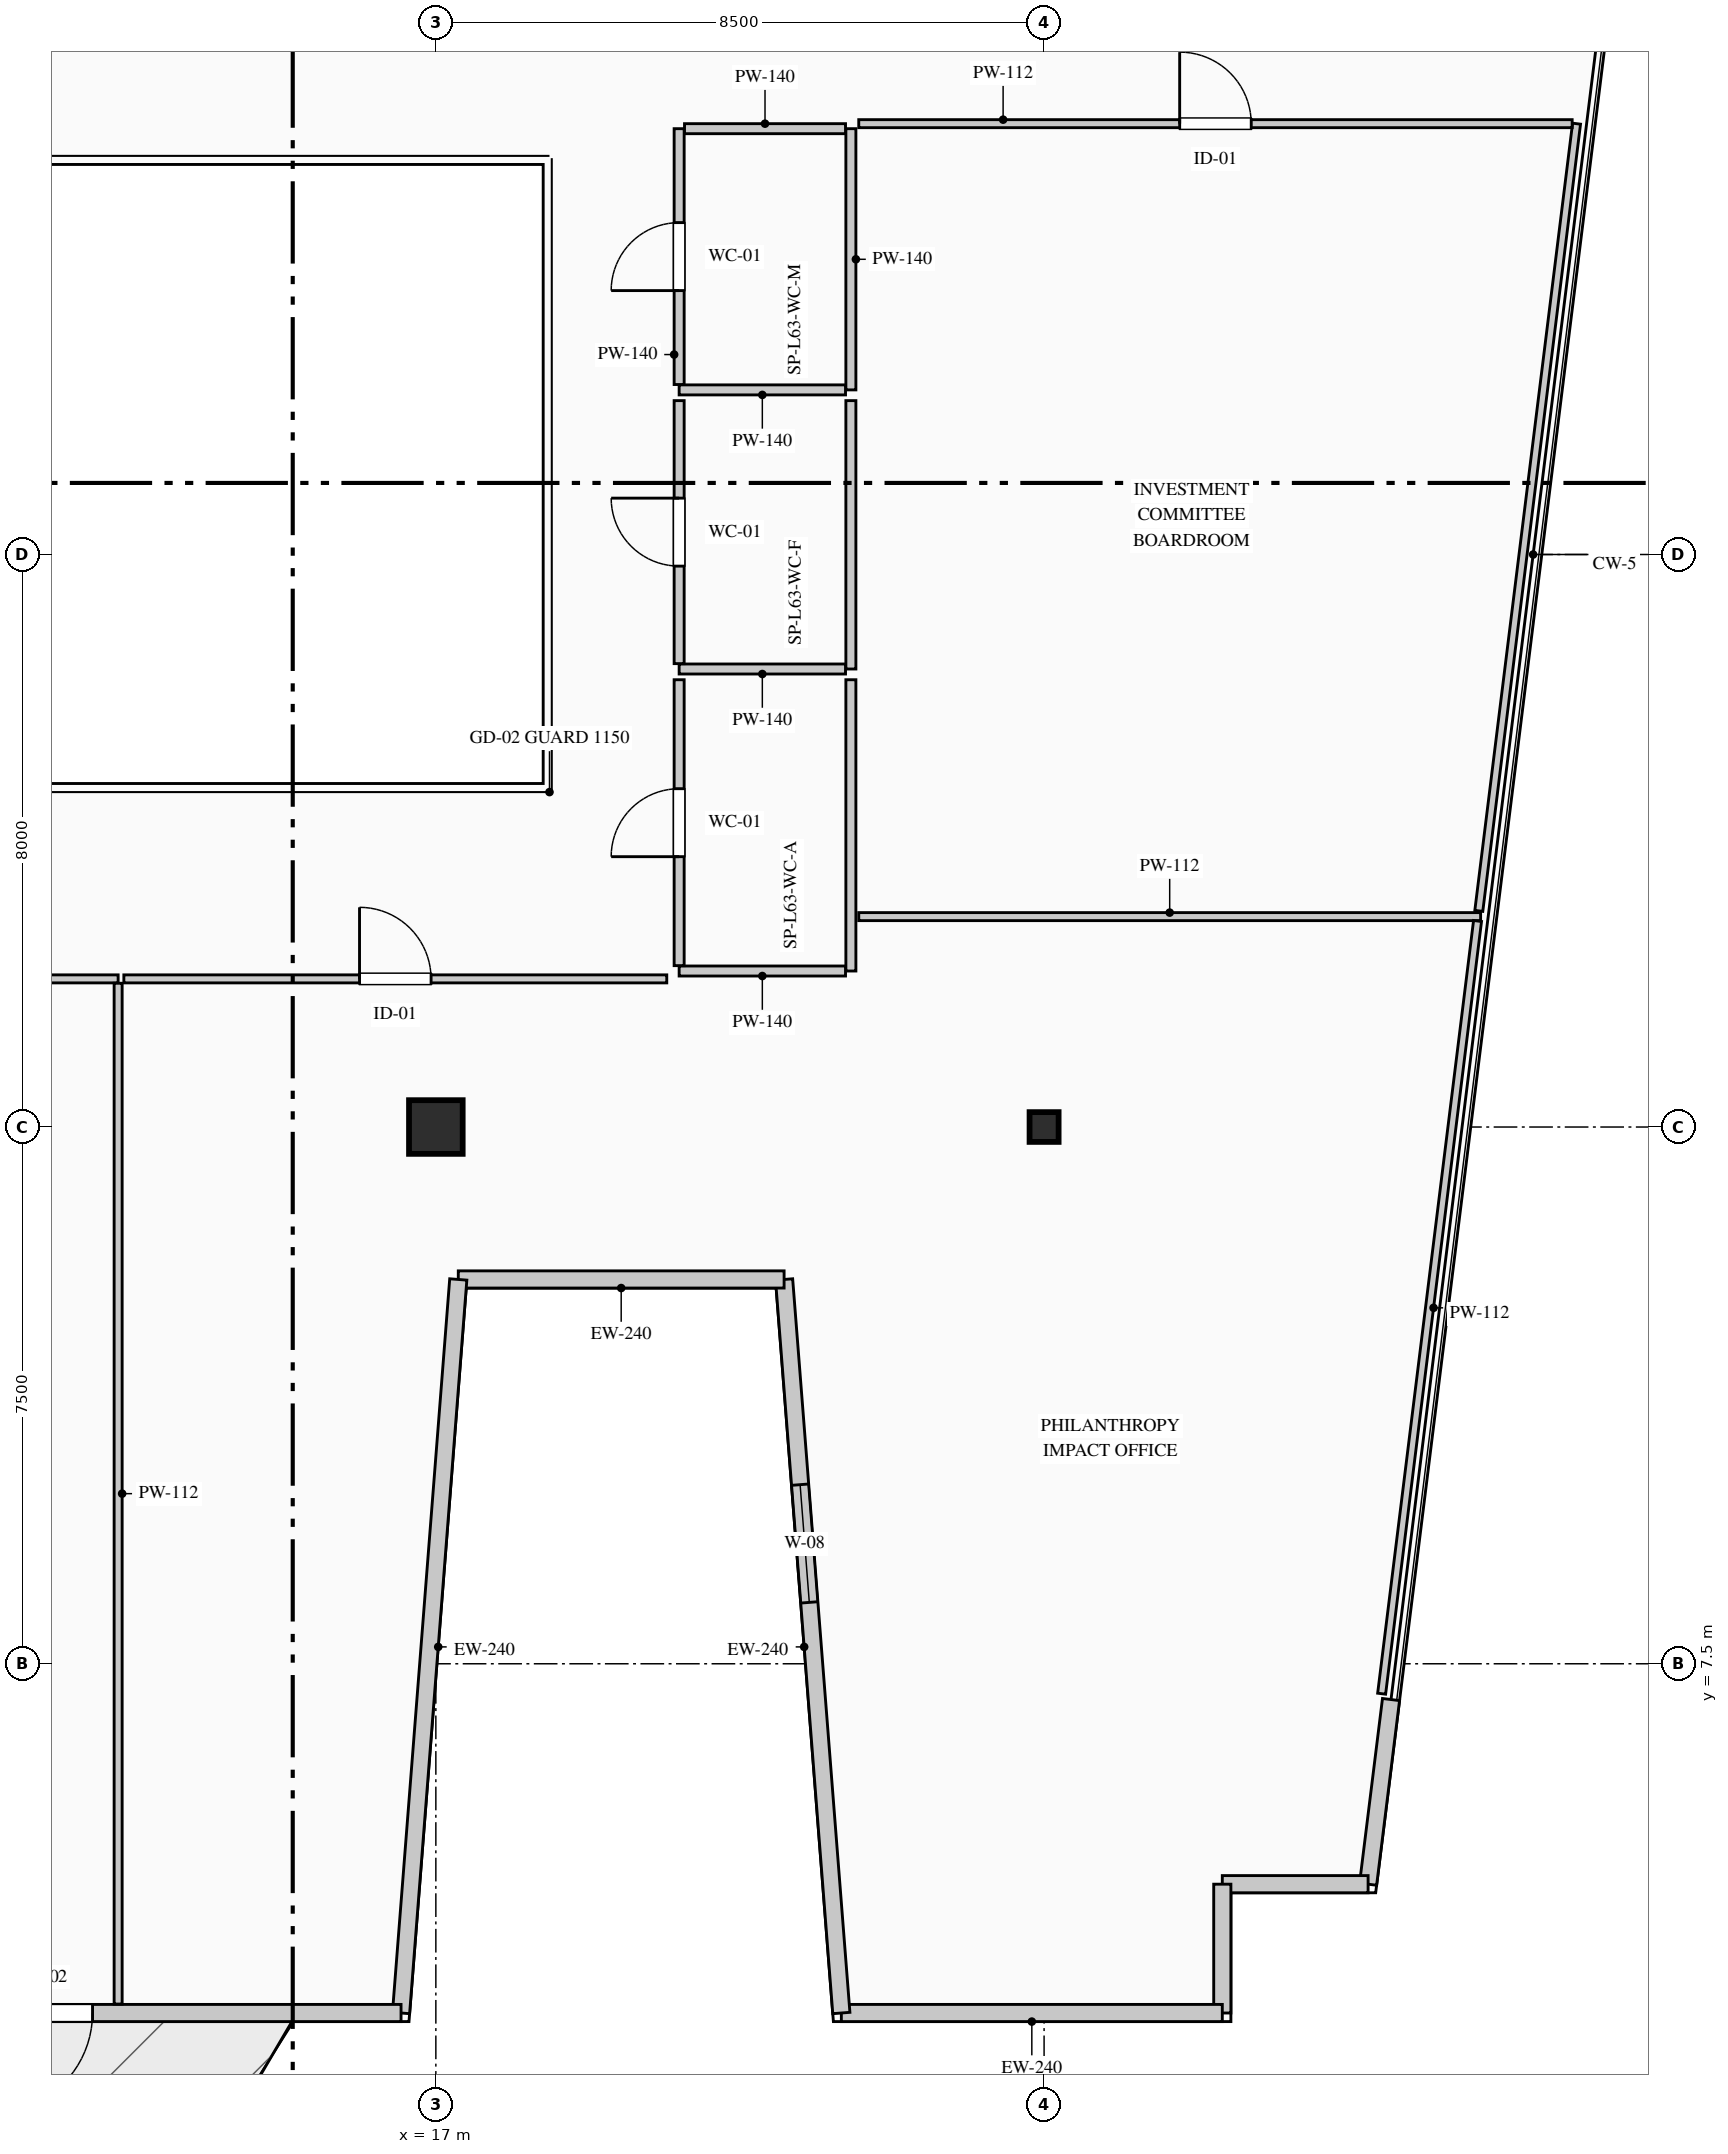
"""IFC4 building model, lengths in metres.
Left out: names, types, materials, properties, quantities, classifications, styles, units other than length and angle.
Written with IfcOpenShell. Run it as: python <this file> out.ifc"""

import sys

from ifc_helpers import new_model, si_unit, direction, frame, frame_2d, origin, origin_2d, place, context, subcontext, project, spatial, rectangle, i_section, extrude, element, fill, save


model = new_model("IFC4")
c1 = context("Model", 3, precision=1e-05, world=origin(), true_north=direction((0.0, 1.0)))
c2 = subcontext(c1, "Body", "Model", "MODEL_VIEW")
j1 = project(units=[si_unit("LENGTHUNIT", "METRE"), si_unit("PLANEANGLEUNIT", "RADIAN")], contexts=[c1])
p1 = place(None, origin())
s1 = spatial("IfcSite", under=j1, at=p1, CompositionType="ELEMENT")
p2 = place(p1, origin())
s2 = spatial("IfcBuilding", under=s1, at=p2, CompositionType="ELEMENT")
p3 = place(p2, frame((0.0, 0.0, 264.6)))
s3 = spatial("IfcBuildingStorey", under=s2, at=p3, CompositionType="ELEMENT", Elevation=264.6)
p4 = place(p3, frame((17.0, 15.0, 0.0), z_axis=(0.0, 0.0, 1.0), x_axis=(1.0, 0.0, 0.0)))
e1 = element("IfcColumn", 1, at=p4, inside=s3, PredefinedType="COLUMN", context=c2, shape_type="SweptSolid", body=[
    extrude(rectangle(XDim=0.75, YDim=0.75, at=origin_2d()), origin(), (0.0, 0.0, 1.0), 3.95),
])
p5 = place(p3, frame((25.5, 15.0, 0.0), z_axis=(0.0, 0.0, 1.0), x_axis=(1.0, 0.0, 0.0)))
e2 = element("IfcColumn", 2, at=p5, inside=s3, PredefinedType="COLUMN", context=c2, shape_type="SweptSolid", body=[
    extrude(i_section(OverallWidth=0.406, OverallDepth=0.416, WebThickness=0.03, FlangeThickness=0.048, FilletRadius=0.015, at=origin_2d()), origin(), (0.0, 0.0, 1.0), 3.95),
])
p6 = place(p3, frame((30.348, 7.0, 0.0), z_axis=(0.0, 0.0, 1.0), x_axis=(-0.123191073593, -0.992382970121, 0.0)))
e3 = element("IfcWall", 3, at=p6, inside=s3, PredefinedType="STANDARD", context=c2, shape_type="SweptSolid", body=[
    extrude(rectangle(XDim=2.6, YDim=0.24, at=frame_2d((1.3, 0.0))), origin(), (0.0, 0.0, 1.0), 3.7),
])
p7 = place(p3, frame((30.028, 4.42, 0.0), z_axis=(0.0, 0.0, 1.0), x_axis=(-1.0, 0.0, 0.0)))
e4 = element("IfcWall", 4, at=p7, inside=s3, PredefinedType="STANDARD", context=c2, shape_type="SweptSolid", body=[
    extrude(rectangle(XDim=2.037, YDim=0.24, at=frame_2d((1.019, 0.0))), origin(), (0.0, 0.0, 1.0), 3.7),
])
p8 = place(p3, frame((27.99, 4.42, 0.0), z_axis=(0.0, 0.0, 1.0), x_axis=(0.0, -1.0, 0.0)))
e5 = element("IfcWall", 5, at=p8, inside=s3, PredefinedType="STANDARD", context=c2, shape_type="SweptSolid", body=[
    extrude(rectangle(XDim=1.8, YDim=0.24, at=frame_2d((0.9, 0.0))), origin(), (0.0, 0.0, 1.0), 3.7),
])
p9 = place(p3, frame((27.99, 2.62, 0.0), z_axis=(0.0, 0.0, 1.0), x_axis=(-1.0, 0.0, 0.0)))
e6 = element("IfcWall", 6, at=p9, inside=s3, PredefinedType="STANDARD", context=c2, shape_type="SweptSolid", body=[
    extrude(rectangle(XDim=5.324, YDim=0.24, at=frame_2d((2.662, 0.0))), origin(), (0.0, 0.0, 1.0), 3.7),
])
p10 = place(p3, frame((22.667, 2.62, 0.0), z_axis=(0.0, 0.0, 1.0), x_axis=(-0.077816860153, 0.996967670627, 0.0)))
e7 = element("IfcWall", 7, at=p10, inside=s3, PredefinedType="STANDARD", context=c2, shape_type="SweptSolid", body=[
    extrude(rectangle(XDim=10.281, YDim=0.24, at=frame_2d((5.141, 0.0))), origin(), (0.0, 0.0, 1.0), 3.7),
])
p11 = place(p10, frame((5.755, 0.0, 0.9)))
e8 = element("IfcOpeningElement", 8, at=p11, cuts=e7, PredefinedType="OPENING", context=c2, shape_type="SweptSolid", body=[
    extrude(rectangle(XDim=1.65, YDim=1.95, at=frame_2d((0.825, 0.975))), frame((0.0, 0.13, 0.0), z_axis=(0.0, -1.0, 0.0), x_axis=(1.0, 0.0, 0.0)), (0.0, 0.0, 1.0), 0.26),
])
p12 = place(p3, frame((21.867, 12.87, 0.0), z_axis=(0.0, 0.0, 1.0), x_axis=(-1.0, 0.0, 0.0)))
e9 = element("IfcWall", 9, at=p12, inside=s3, PredefinedType="STANDARD", context=c2, shape_type="SweptSolid", body=[
    extrude(rectangle(XDim=4.553, YDim=0.24, at=frame_2d((2.277, 0.0))), origin(), (0.0, 0.0, 1.0), 3.7),
])
p13 = place(p3, frame((17.313, 12.87, 0.0), z_axis=(0.0, 0.0, 1.0), x_axis=(-0.077816860153, -0.996967670627, 0.0)))
e10 = element("IfcWall", 10, at=p13, inside=s3, PredefinedType="STANDARD", context=c2, shape_type="SweptSolid", body=[
    extrude(rectangle(XDim=10.281, YDim=0.24, at=frame_2d((5.141, 0.0))), origin(), (0.0, 0.0, 1.0), 3.7),
])
p14 = place(p3, frame((16.513, 2.62, 0.0), z_axis=(0.0, 0.0, 1.0), x_axis=(-1.0, 0.0, 0.0)))
e11 = element("IfcWall", 11, at=p14, inside=s3, PredefinedType="STANDARD", context=c2, shape_type="SweptSolid", body=[
    extrude(rectangle(XDim=8.408, YDim=0.24, at=frame_2d((4.204, 0.0))), origin(), (0.0, 0.0, 1.0), 3.7),
])
p15 = place(p14, frame((4.311, 0.0, 0.0)))
e12 = element("IfcOpeningElement", 12, at=p15, cuts=e11, PredefinedType="OPENING", context=c2, shape_type="SweptSolid", body=[
    extrude(rectangle(XDim=1.4, YDim=2.2, at=frame_2d((0.7, 1.1))), frame((0.0, 0.13, 0.0), z_axis=(0.0, -1.0, 0.0), x_axis=(1.0, 0.0, 0.0)), (0.0, 0.0, 1.0), 0.26),
])
p16 = place(p3, frame((22.8, 28.95, 0.0), z_axis=(0.0, 0.0, 1.0), x_axis=(0.0, -1.0, 0.0)))
e13 = element("IfcWall", 13, at=p16, inside=s3, PredefinedType="PARTITIONING", context=c2, shape_type="SweptSolid", body=[
    extrude(rectangle(XDim=3.65, YDim=0.14, at=frame_2d((1.825, 0.0))), origin(), (0.0, 0.0, 1.0), 3.385),
])
p17 = place(p3, frame((22.725, 25.3, 0.0), z_axis=(0.0, 0.0, 1.0), x_axis=(-1.0, 0.0, 0.0)))
e14 = element("IfcWall", 14, at=p17, inside=s3, PredefinedType="PARTITIONING", context=c2, shape_type="SweptSolid", body=[
    extrude(rectangle(XDim=2.325, YDim=0.14, at=frame_2d((1.163, 0.0))), origin(), (0.0, 0.0, 1.0), 3.7),
])
p18 = place(p3, frame((20.4, 25.375, 0.0), z_axis=(0.0, 0.0, 1.0), x_axis=(0.0, 1.0, 0.0)))
e15 = element("IfcWall", 15, at=p18, inside=s3, PredefinedType="PARTITIONING", context=c2, shape_type="SweptSolid", body=[
    extrude(rectangle(XDim=3.575, YDim=0.14, at=frame_2d((1.788, 0.0))), origin(), (0.0, 0.0, 1.0), 3.7),
])
p19 = place(p18, frame((1.312, 0.0, 0.0)))
e16 = element("IfcOpeningElement", 16, at=p19, cuts=e15, PredefinedType="OPENING", context=c2, shape_type="SweptSolid", body=[
    extrude(rectangle(XDim=0.95, YDim=2.15, at=frame_2d((0.475, 1.075))), frame((0.0, 0.08, 0.0), z_axis=(0.0, -1.0, 0.0), x_axis=(1.0, 0.0, 0.0)), (0.0, 0.0, 1.0), 0.16),
])
p20 = place(p3, frame((20.475, 28.95, 0.0), z_axis=(0.0, 0.0, 1.0), x_axis=(1.0, 0.0, 0.0)))
e17 = element("IfcWall", 17, at=p20, inside=s3, PredefinedType="PARTITIONING", context=c2, shape_type="SweptSolid", body=[
    extrude(rectangle(XDim=2.25, YDim=0.14, at=frame_2d((1.125, 0.0))), origin(), (0.0, 0.0, 1.0), 3.7),
])
p21 = place(p3, frame((22.8, 25.15, 0.0), z_axis=(0.0, 0.0, 1.0), x_axis=(0.0, -1.0, 0.0)))
e18 = element("IfcWall", 18, at=p21, inside=s3, PredefinedType="PARTITIONING", context=c2, shape_type="SweptSolid", body=[
    extrude(rectangle(XDim=3.75, YDim=0.14, at=frame_2d((1.875, 0.0))), origin(), (0.0, 0.0, 1.0), 3.385),
])
p22 = place(p3, frame((22.725, 21.4, 0.0), z_axis=(0.0, 0.0, 1.0), x_axis=(-1.0, 0.0, 0.0)))
e19 = element("IfcWall", 19, at=p22, inside=s3, PredefinedType="PARTITIONING", context=c2, shape_type="SweptSolid", body=[
    extrude(rectangle(XDim=2.325, YDim=0.14, at=frame_2d((1.163, 0.0))), origin(), (0.0, 0.0, 1.0), 3.7),
])
p23 = place(p3, frame((20.4, 21.475, 0.0), z_axis=(0.0, 0.0, 1.0), x_axis=(0.0, 1.0, 0.0)))
e20 = element("IfcWall", 20, at=p23, inside=s3, PredefinedType="PARTITIONING", context=c2, shape_type="SweptSolid", body=[
    extrude(rectangle(XDim=3.675, YDim=0.14, at=frame_2d((1.837, 0.0))), origin(), (0.0, 0.0, 1.0), 3.7),
])
p24 = place(p23, frame((1.363, 0.0, 0.0)))
e21 = element("IfcOpeningElement", 21, at=p24, cuts=e20, PredefinedType="OPENING", context=c2, shape_type="SweptSolid", body=[
    extrude(rectangle(XDim=0.95, YDim=2.15, at=frame_2d((0.475, 1.075))), frame((0.0, 0.08, 0.0), z_axis=(0.0, -1.0, 0.0), x_axis=(1.0, 0.0, 0.0)), (0.0, 0.0, 1.0), 0.16),
])
p25 = place(p3, frame((22.8, 21.25, 0.0), z_axis=(0.0, 0.0, 1.0), x_axis=(0.0, -1.0, 0.0)))
e22 = element("IfcWall", 22, at=p25, inside=s3, PredefinedType="PARTITIONING", context=c2, shape_type="SweptSolid", body=[
    extrude(rectangle(XDim=4.07, YDim=0.14, at=frame_2d((2.035, 0.0))), origin(), (0.0, 0.0, 1.0), 3.385),
])
p26 = place(p3, frame((22.725, 17.18, 0.0), z_axis=(0.0, 0.0, 1.0), x_axis=(-1.0, 0.0, 0.0)))
e23 = element("IfcWall", 23, at=p26, inside=s3, PredefinedType="PARTITIONING", context=c2, shape_type="SweptSolid", body=[
    extrude(rectangle(XDim=2.325, YDim=0.14, at=frame_2d((1.163, 0.0))), origin(), (0.0, 0.0, 1.0), 3.7),
])
p27 = place(p3, frame((20.4, 17.255, 0.0), z_axis=(0.0, 0.0, 1.0), x_axis=(0.0, 1.0, 0.0)))
e24 = element("IfcWall", 24, at=p27, inside=s3, PredefinedType="PARTITIONING", context=c2, shape_type="SweptSolid", body=[
    extrude(rectangle(XDim=3.995, YDim=0.14, at=frame_2d((1.998, 0.0))), origin(), (0.0, 0.0, 1.0), 3.7),
])
p28 = place(p27, frame((1.522, 0.0, 0.0)))
e25 = element("IfcOpeningElement", 25, at=p28, cuts=e24, PredefinedType="OPENING", context=c2, shape_type="SweptSolid", body=[
    extrude(rectangle(XDim=0.95, YDim=2.15, at=frame_2d((0.475, 1.075))), frame((0.0, 0.08, 0.0), z_axis=(0.0, -1.0, 0.0), x_axis=(1.0, 0.0, 0.0)), (0.0, 0.0, 1.0), 0.16),
])
p29 = place(p3, frame((5.122, 17.07, 0.0), z_axis=(0.0, 0.0, 1.0), x_axis=(1.0, 0.0, 0.0)))
e26 = element("IfcWall", 26, at=p29, inside=s3, PredefinedType="PARTITIONING", context=c2, shape_type="SweptSolid", body=[
    extrude(rectangle(XDim=7.438, YDim=0.112, at=frame_2d((3.719, 0.0))), origin(), (0.0, 0.0, 1.0), 3.7),
])
p30 = place(p29, frame((3.219, 0.0, 0.0)))
e27 = element("IfcOpeningElement", 27, at=p30, cuts=e26, PredefinedType="OPENING", context=c2, shape_type="SweptSolid", body=[
    extrude(rectangle(XDim=1.0, YDim=2.15, at=frame_2d((0.5, 1.075))), frame((0.0, 0.066, 0.0), z_axis=(0.0, -1.0, 0.0), x_axis=(1.0, 0.0, 0.0)), (0.0, 0.0, 1.0), 0.132),
])
p31 = place(p3, frame((12.56, 17.009, 0.0), z_axis=(0.0, 0.0, 1.0), x_axis=(0.0, -1.0, 0.0)))
e28 = element("IfcWall", 28, at=p31, inside=s3, PredefinedType="PARTITIONING", context=c2, shape_type="SweptSolid", body=[
    extrude(rectangle(XDim=14.264, YDim=0.112, at=frame_2d((7.132, 0.0))), origin(), (0.0, 0.0, 1.0), 3.7),
])
p32 = place(p3, frame((22.91, 17.94, 0.0), z_axis=(0.0, 0.0, 1.0), x_axis=(1.0, 0.0, 0.0)))
e29 = element("IfcWall", 29, at=p32, inside=s3, PredefinedType="PARTITIONING", context=c2, shape_type="SweptSolid", body=[
    extrude(rectangle(XDim=8.69, YDim=0.112, at=frame_2d((4.345, 0.0))), origin(), (0.0, 0.0, 1.0), 3.7),
])
p33 = place(p3, frame((31.557, 17.879, 0.0), z_axis=(0.0, 0.0, 1.0), x_axis=(-0.12319234905, -0.99238281179, 0.0)))
e30 = element("IfcWall", 30, at=p33, inside=s3, PredefinedType="PARTITIONING", context=c2, shape_type="SweptSolid", body=[
    extrude(rectangle(XDim=10.88, YDim=0.112, at=frame_2d((5.44, 0.0))), origin(), (0.0, 0.0, 1.0), 3.7),
])
p34 = place(p3, frame((12.64, 17.07, 0.0), z_axis=(0.0, 0.0, 1.0), x_axis=(1.0, 0.0, 0.0)))
e31 = element("IfcWall", 31, at=p34, inside=s3, PredefinedType="PARTITIONING", context=c2, shape_type="SweptSolid", body=[
    extrude(rectangle(XDim=7.587, YDim=0.112, at=frame_2d((3.793, 0.0))), origin(), (0.0, 0.0, 1.0), 3.7),
])
p35 = place(p34, frame((3.293, 0.0, 0.0)))
e32 = element("IfcOpeningElement", 32, at=p35, cuts=e31, PredefinedType="OPENING", context=c2, shape_type="SweptSolid", body=[
    extrude(rectangle(XDim=1.0, YDim=2.15, at=frame_2d((0.5, 1.075))), frame((0.0, 0.066, 0.0), z_axis=(0.0, -1.0, 0.0), x_axis=(1.0, 0.0, 0.0)), (0.0, 0.0, 1.0), 0.132),
])
p36 = place(p3, frame((32.941, 29.02, 0.0), z_axis=(0.0, 0.0, 1.0), x_axis=(-0.123232290614, -0.99237785271, 0.0)))
e33 = element("IfcWall", 33, at=p36, inside=s3, PredefinedType="PARTITIONING", context=c2, shape_type="SweptSolid", body=[
    extrude(rectangle(XDim=11.084, YDim=0.112, at=frame_2d((5.542, 0.0))), origin(), (0.0, 0.0, 1.0), 3.7),
])
p37 = place(p3, frame((22.91, 29.02, 0.0), z_axis=(0.0, 0.0, 1.0), x_axis=(1.0, 0.0, 0.0)))
e34 = element("IfcWall", 34, at=p37, inside=s3, PredefinedType="PARTITIONING", context=c2, shape_type="SweptSolid", body=[
    extrude(rectangle(XDim=9.969, YDim=0.112, at=frame_2d((4.985, 0.0))), origin(), (0.0, 0.0, 1.0), 3.7),
])
p38 = place(p37, frame((4.485, 0.0, 0.0)))
e35 = element("IfcOpeningElement", 35, at=p38, cuts=e34, PredefinedType="OPENING", context=c2, shape_type="SweptSolid", body=[
    extrude(rectangle(XDim=1.0, YDim=2.15, at=frame_2d((0.5, 1.075))), frame((0.0, 0.066, 0.0), z_axis=(0.0, -1.0, 0.0), x_axis=(1.0, 0.0, 0.0)), (0.0, 0.0, 1.0), 0.132),
])
p39 = place(p11, origin())
e36 = element("IfcWindow", 36, at=p39, inside=s3, PartitioningType="SINGLE_PANEL", PredefinedType="WINDOW", context=c2, shape_type="SweptSolid", body=[
    extrude(rectangle(XDim=1.65, YDim=1.95, at=frame_2d((0.825, 0.975))), frame((0.0, 0.03, 0.0), z_axis=(0.0, -1.0, 0.0), x_axis=(1.0, 0.0, 0.0)), (0.0, 0.0, 1.0), 0.06),
])
fill(e8, e36)
p40 = place(p15, origin())
e37 = element("IfcDoor", 37, at=p40, inside=s3, OperationType="SINGLE_SWING_RIGHT", PredefinedType="DOOR", context=c2, shape_type="SweptSolid", body=[
    extrude(rectangle(XDim=1.4, YDim=2.2, at=frame_2d((0.7, 1.1))), frame((0.0, 0.025, 0.0), z_axis=(0.0, -1.0, 0.0), x_axis=(1.0, 0.0, 0.0)), (0.0, 0.0, 1.0), 0.05),
])
fill(e12, e37)
p41 = place(p19, origin())
e38 = element("IfcDoor", 38, at=p41, inside=s3, OperationType="SINGLE_SWING_LEFT", PredefinedType="DOOR", context=c2, shape_type="SweptSolid", body=[
    extrude(rectangle(XDim=0.95, YDim=2.15, at=frame_2d((0.475, 1.075))), frame((0.0, 0.025, 0.0), z_axis=(0.0, -1.0, 0.0), x_axis=(1.0, 0.0, 0.0)), (0.0, 0.0, 1.0), 0.05),
])
fill(e16, e38)
p42 = place(p24, origin())
e39 = element("IfcDoor", 39, at=p42, inside=s3, OperationType="SINGLE_SWING_RIGHT", PredefinedType="DOOR", context=c2, shape_type="SweptSolid", body=[
    extrude(rectangle(XDim=0.95, YDim=2.15, at=frame_2d((0.475, 1.075))), frame((0.0, 0.025, 0.0), z_axis=(0.0, -1.0, 0.0), x_axis=(1.0, 0.0, 0.0)), (0.0, 0.0, 1.0), 0.05),
])
fill(e21, e39)
p43 = place(p28, origin())
e40 = element("IfcDoor", 40, at=p43, inside=s3, OperationType="SINGLE_SWING_LEFT", PredefinedType="DOOR", context=c2, shape_type="SweptSolid", body=[
    extrude(rectangle(XDim=0.95, YDim=2.15, at=frame_2d((0.475, 1.075))), frame((0.0, 0.025, 0.0), z_axis=(0.0, -1.0, 0.0), x_axis=(1.0, 0.0, 0.0)), (0.0, 0.0, 1.0), 0.05),
])
fill(e25, e40)
p44 = place(p35, origin())
e41 = element("IfcDoor", 41, at=p44, inside=s3, OperationType="SINGLE_SWING_LEFT", PredefinedType="DOOR", context=c2, shape_type="SweptSolid", body=[
    extrude(rectangle(XDim=1.0, YDim=2.15, at=frame_2d((0.5, 1.075))), frame((0.0, 0.025, 0.0), z_axis=(0.0, -1.0, 0.0), x_axis=(1.0, 0.0, 0.0)), (0.0, 0.0, 1.0), 0.05),
])
fill(e32, e41)
p45 = place(p38, origin())
e42 = element("IfcDoor", 42, at=p45, inside=s3, OperationType="SINGLE_SWING_LEFT", PredefinedType="DOOR", context=c2, shape_type="SweptSolid", body=[
    extrude(rectangle(XDim=1.0, YDim=2.15, at=frame_2d((0.5, 1.075))), frame((0.0, 0.025, 0.0), z_axis=(0.0, -1.0, 0.0), x_axis=(1.0, 0.0, 0.0)), (0.0, 0.0, 1.0), 0.05),
])
fill(e35, e42)
save(model, sys.argv[1])
